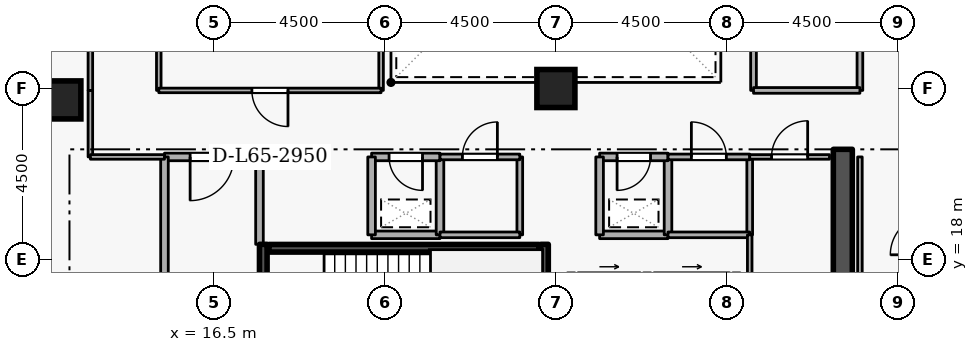
"""IFC4 building model, lengths in metres.
Left out: names, types, materials, properties, quantities, classifications, styles, units other than length and angle.
Written with IfcOpenShell. Run it as: python <this file> out.ifc"""

import sys

from ifc_helpers import new_model, si_unit, direction, frame, frame_2d, origin, origin_2d, place, context, subcontext, project, spatial, rectangle, extrude, element, fill, save


model = new_model("IFC4")
c1 = context("Model", 3, precision=1e-05, world=origin(), true_north=direction((0.0, 1.0)))
c2 = subcontext(c1, "Body", "Model", "MODEL_VIEW")
j1 = project(units=[si_unit("LENGTHUNIT", "METRE"), si_unit("PLANEANGLEUNIT", "RADIAN")], contexts=[c1])
p1 = place(None, origin())
s1 = spatial("IfcSite", under=j1, at=p1, CompositionType="ELEMENT")
p2 = place(p1, origin())
s2 = spatial("IfcBuilding", under=s1, at=p2, CompositionType="ELEMENT")
p3 = place(p2, frame((0.0, 0.0, 243.9)))
s3 = spatial("IfcBuildingStorey", under=s2, at=p3, CompositionType="ELEMENT", Elevation=243.9)
p4 = place(p3, frame((33.05, 15.1, 0.0), z_axis=(0.0, 0.0, 1.0), x_axis=(0.0, 1.0, 0.0)))
e1 = element("IfcWall", 1, at=p4, inside=s3, PredefinedType="SHEAR", context=c2, shape_type="SweptSolid", body=[
    extrude(rectangle(XDim=5.8, YDim=0.5, at=frame_2d((2.9, 0.0))), origin(), (0.0, 0.0, 1.0), 3.6),
])
for number, where, z_axis, x_axis in (
    (2, (12.5, 22.2, 0.0), (0.0, 0.0, 1.0), (1.0, 0.0, 0.0)),
    (3, (25.5, 22.5, 0.0), (0.0, 0.0, 1.0), (1.0, 0.0, 0.0)),
):
    element("IfcColumn", number, at=place(p3, frame(where, z_axis=z_axis, x_axis=x_axis)), inside=s3, PredefinedType="COLUMN", context=c2, shape_type="SweptSolid", body=[
        extrude(rectangle(XDim=1.0, YDim=1.0, at=origin_2d()), origin(), (0.0, 0.0, 1.0), 3.6),
    ])
p5 = place(p3, frame((26.08, 17.55, 0.0), z_axis=(0.0, 0.0, 1.0), x_axis=(1.0, 0.0, 0.0)))
e4 = element("IfcWall", 4, at=p5, inside=s3, PredefinedType="STANDARD", context=c2, shape_type="SweptSolid", body=[
    extrude(rectangle(XDim=1.64, YDim=0.2, at=frame_2d((0.82, 0.0))), origin(), (0.0, 0.0, 1.0), 3.34),
])
p6 = place(p5, frame((0.31, 0.0, 0.0)))
e5 = element("IfcOpeningElement", 5, at=p6, cuts=e4, PredefinedType="OPENING", context=c2, shape_type="SweptSolid", body=[
    extrude(rectangle(XDim=1.02, YDim=2.06, at=frame_2d((0.51, 1.03))), frame((0.0, 0.11, 0.0), z_axis=(0.0, -1.0, 0.0), x_axis=(1.0, 0.0, 0.0)), (0.0, 0.0, 1.0), 0.22),
])
p7 = place(p3, frame((28.08, 17.55, 0.0), z_axis=(0.0, 0.0, 1.0), x_axis=(1.0, 0.0, 0.0)))
e6 = element("IfcWall", 6, at=p7, inside=s3, PredefinedType="STANDARD", context=c2, shape_type="SweptSolid", body=[
    extrude(rectangle(XDim=1.99, YDim=0.2, at=frame_2d((0.995, 0.0))), origin(), (0.0, 0.0, 1.0), 3.34),
])
p8 = place(p7, frame((0.485, 0.0, 0.0)))
e7 = element("IfcOpeningElement", 7, at=p8, cuts=e6, PredefinedType="OPENING", context=c2, shape_type="SweptSolid", body=[
    extrude(rectangle(XDim=1.02, YDim=2.06, at=frame_2d((0.51, 1.03))), frame((0.0, 0.11, 0.0), z_axis=(0.0, -1.0, 0.0), x_axis=(1.0, 0.0, 0.0)), (0.0, 0.0, 1.0), 0.22),
])
p9 = place(p3, frame((17.8, 15.05, 0.0), z_axis=(0.0, 0.0, 1.0), x_axis=(0.0, 1.0, 0.0)))
e8 = element("IfcWall", 8, at=p9, inside=s3, PredefinedType="SHEAR", context=c2, shape_type="SweptSolid", body=[
    extrude(rectangle(XDim=3.35, YDim=0.2, at=frame_2d((1.675, 0.0))), origin(), (0.0, 0.0, 1.0), 3.6),
])
p10 = place(p9, frame((1.125, 0.0, 0.0)))
e9 = element("IfcOpeningElement", 9, at=p10, cuts=e8, PredefinedType="OPENING", context=c2, shape_type="SweptSolid", body=[
    extrude(rectangle(XDim=1.1, YDim=2.1, at=frame_2d((0.55, 1.05))), frame((0.0, 0.11, 0.0), z_axis=(0.0, -1.0, 0.0), x_axis=(1.0, 0.0, 0.0)), (0.0, 0.0, 1.0), 0.22),
])
p11 = place(p3, frame((25.2, 18.4, 0.0), z_axis=(0.0, 0.0, 1.0), x_axis=(0.0, -1.0, 0.0)))
e10 = element("IfcWall", 10, at=p11, inside=s3, PredefinedType="SHEAR", context=c2, shape_type="SweptSolid", body=[
    extrude(rectangle(XDim=3.35, YDim=0.2, at=frame_2d((1.675, 0.0))), origin(), (0.0, 0.0, 1.0), 3.6),
])
p12 = place(p3, frame((25.05, 18.297, 0.0), z_axis=(0.0, 0.0, 1.0), x_axis=(-1.0, 0.0, 0.0)))
e11 = element("IfcWall", 11, at=p12, inside=s3, PredefinedType="SHEAR", context=c2, shape_type="SweptSolid", body=[
    extrude(rectangle(XDim=7.1, YDim=0.2, at=frame_2d((3.55, 0.0))), origin(), (0.0, 0.0, 1.0), 3.6),
])
p13 = place(p3, frame((17.7, 18.4, 0.0), z_axis=(0.0, 0.0, 1.0), x_axis=(0.0, 1.0, 0.0)))
e12 = element("IfcWall", 12, at=p13, inside=s3, PredefinedType="STANDARD", context=c2, shape_type="SweptSolid", body=[
    extrude(rectangle(XDim=2.3, YDim=0.2, at=frame_2d((1.15, 0.0))), origin(), (0.0, 0.0, 1.0), 2.545),
])
p14 = place(p3, frame((17.7, 20.7, 0.0), z_axis=(0.0, 0.0, 1.0), x_axis=(-1.0, 0.0, 0.0)))
e13 = element("IfcWall", 13, at=p14, inside=s3, PredefinedType="STANDARD", context=c2, shape_type="SweptSolid", body=[
    extrude(rectangle(XDim=2.5, YDim=0.2, at=frame_2d((1.25, 0.0))), origin(), (0.0, 0.0, 1.0), 3.34),
])
p15 = place(p14, frame((0.675, 0.0, 0.0)))
e14 = element("IfcOpeningElement", 14, at=p15, cuts=e13, PredefinedType="OPENING", context=c2, shape_type="SweptSolid", body=[
    extrude(rectangle(XDim=1.15, YDim=2.1, at=frame_2d((0.575, 1.05))), frame((0.0, 0.11, 0.0), z_axis=(0.0, -1.0, 0.0), x_axis=(1.0, 0.0, 0.0)), (0.0, 0.0, 1.0), 0.22),
])
p16 = place(p3, frame((15.2, 20.7, 0.0), z_axis=(0.0, 0.0, 1.0), x_axis=(0.0, -1.0, 0.0)))
e15 = element("IfcWall", 15, at=p16, inside=s3, PredefinedType="STANDARD", context=c2, shape_type="SweptSolid", body=[
    extrude(rectangle(XDim=5.7, YDim=0.2, at=frame_2d((2.85, 0.0))), origin(), (0.0, 0.0, 1.0), 3.34),
])
p17 = place(p3, frame((26.65, 18.65, 0.0), z_axis=(0.0, 0.0, 1.0), x_axis=(1.0, 0.0, 0.0)))
e16 = element("IfcWall", 16, at=p17, inside=s3, PredefinedType="STANDARD", context=c2, shape_type="SweptSolid", body=[
    extrude(rectangle(XDim=1.8, YDim=0.2, at=frame_2d((0.9, 0.0))), origin(), (0.0, 0.0, 1.0), 3.34),
])
p18 = place(p3, frame((28.45, 18.65, 0.0), z_axis=(0.0, 0.0, 1.0), x_axis=(0.0, 1.0, 0.0)))
e17 = element("IfcWall", 17, at=p18, inside=s3, PredefinedType="STANDARD", context=c2, shape_type="SweptSolid", body=[
    extrude(rectangle(XDim=2.05, YDim=0.2, at=frame_2d((1.025, 0.0))), origin(), (0.0, 0.0, 1.0), 3.34),
])
p19 = place(p3, frame((28.45, 20.7, 0.0), z_axis=(0.0, 0.0, 1.0), x_axis=(-1.0, 0.0, 0.0)))
e18 = element("IfcWall", 18, at=p19, inside=s3, PredefinedType="STANDARD", context=c2, shape_type="SweptSolid", body=[
    extrude(rectangle(XDim=1.8, YDim=0.2, at=frame_2d((0.9, 0.0))), origin(), (0.0, 0.0, 1.0), 3.34),
])
p20 = place(p19, frame((0.46, 0.0, 0.0)))
e19 = element("IfcOpeningElement", 19, at=p20, cuts=e18, PredefinedType="OPENING", context=c2, shape_type="SweptSolid", body=[
    extrude(rectangle(XDim=0.88, YDim=2.04, at=frame_2d((0.44, 1.02))), frame((0.0, 0.11, 0.0), z_axis=(0.0, -1.0, 0.0), x_axis=(1.0, 0.0, 0.0)), (0.0, 0.0, 1.0), 0.22),
])
p21 = place(p3, frame((26.65, 20.7, 0.0), z_axis=(0.0, 0.0, 1.0), x_axis=(0.0, -1.0, 0.0)))
e20 = element("IfcWall", 20, at=p21, inside=s3, PredefinedType="STANDARD", context=c2, shape_type="SweptSolid", body=[
    extrude(rectangle(XDim=2.05, YDim=0.2, at=frame_2d((1.025, 0.0))), origin(), (0.0, 0.0, 1.0), 3.34),
])
p22 = place(p3, frame((20.65, 18.65, 0.0), z_axis=(0.0, 0.0, 1.0), x_axis=(1.0, 0.0, 0.0)))
e21 = element("IfcWall", 21, at=p22, inside=s3, PredefinedType="STANDARD", context=c2, shape_type="SweptSolid", body=[
    extrude(rectangle(XDim=1.8, YDim=0.2, at=frame_2d((0.9, 0.0))), origin(), (0.0, 0.0, 1.0), 3.34),
])
p23 = place(p3, frame((22.45, 18.65, 0.0), z_axis=(0.0, 0.0, 1.0), x_axis=(0.0, 1.0, 0.0)))
e22 = element("IfcWall", 22, at=p23, inside=s3, PredefinedType="STANDARD", context=c2, shape_type="SweptSolid", body=[
    extrude(rectangle(XDim=2.05, YDim=0.2, at=frame_2d((1.025, 0.0))), origin(), (0.0, 0.0, 1.0), 3.34),
])
p24 = place(p3, frame((22.45, 20.7, 0.0), z_axis=(0.0, 0.0, 1.0), x_axis=(-1.0, 0.0, 0.0)))
e23 = element("IfcWall", 23, at=p24, inside=s3, PredefinedType="STANDARD", context=c2, shape_type="SweptSolid", body=[
    extrude(rectangle(XDim=1.8, YDim=0.2, at=frame_2d((0.9, 0.0))), origin(), (0.0, 0.0, 1.0), 3.34),
])
p25 = place(p24, frame((0.46, 0.0, 0.0)))
e24 = element("IfcOpeningElement", 24, at=p25, cuts=e23, PredefinedType="OPENING", context=c2, shape_type="SweptSolid", body=[
    extrude(rectangle(XDim=0.88, YDim=2.04, at=frame_2d((0.44, 1.02))), frame((0.0, 0.11, 0.0), z_axis=(0.0, -1.0, 0.0), x_axis=(1.0, 0.0, 0.0)), (0.0, 0.0, 1.0), 0.22),
])
p26 = place(p3, frame((20.65, 20.7, 0.0), z_axis=(0.0, 0.0, 1.0), x_axis=(0.0, -1.0, 0.0)))
e25 = element("IfcWall", 25, at=p26, inside=s3, PredefinedType="STANDARD", context=c2, shape_type="SweptSolid", body=[
    extrude(rectangle(XDim=2.05, YDim=0.2, at=frame_2d((1.025, 0.0))), origin(), (0.0, 0.0, 1.0), 3.34),
])
p27 = place(p3, frame((24.55, 20.7, 0.0), z_axis=(0.0, 0.0, 1.0), x_axis=(0.0, -1.0, 0.0)))
e26 = element("IfcWall", 26, at=p27, inside=s3, PredefinedType="PARTITIONING", context=c2, shape_type="SweptSolid", body=[
    extrude(rectangle(XDim=2.05, YDim=0.15, at=frame_2d((1.025, 0.0))), origin(), (0.0, 0.0, 1.0), 3.34),
])
p28 = place(p3, frame((24.55, 18.65, 0.0), z_axis=(0.0, 0.0, 1.0), x_axis=(-1.0, 0.0, 0.0)))
e27 = element("IfcWall", 27, at=p28, inside=s3, PredefinedType="PARTITIONING", context=c2, shape_type="SweptSolid", body=[
    extrude(rectangle(XDim=2.1, YDim=0.15, at=frame_2d((1.05, 0.0))), origin(), (0.0, 0.0, 1.0), 3.34),
])
p29 = place(p3, frame((22.45, 20.7, 0.0), z_axis=(0.0, 0.0, 1.0), x_axis=(1.0, 0.0, 0.0)))
e28 = element("IfcWall", 28, at=p29, inside=s3, PredefinedType="PARTITIONING", context=c2, shape_type="SweptSolid", body=[
    extrude(rectangle(XDim=2.1, YDim=0.15, at=frame_2d((1.05, 0.0))), origin(), (0.0, 0.0, 1.0), 3.34),
])
p30 = place(p29, frame((0.59, 0.0, 0.0)))
e29 = element("IfcOpeningElement", 29, at=p30, cuts=e28, PredefinedType="OPENING", context=c2, shape_type="SweptSolid", body=[
    extrude(rectangle(XDim=0.92, YDim=2.08, at=frame_2d((0.46, 1.04))), frame((0.0, 0.085, 0.0), z_axis=(0.0, -1.0, 0.0), x_axis=(1.0, 0.0, 0.0)), (0.0, 0.0, 1.0), 0.17),
])
p31 = place(p3, frame((30.6, 20.7, 0.0), z_axis=(0.0, 0.0, 1.0), x_axis=(0.0, -1.0, 0.0)))
e30 = element("IfcWall", 30, at=p31, inside=s3, PredefinedType="PARTITIONING", context=c2, shape_type="SweptSolid", body=[
    extrude(rectangle(XDim=2.05, YDim=0.15, at=frame_2d((1.025, 0.0))), origin(), (0.0, 0.0, 1.0), 3.34),
])
p32 = place(p3, frame((30.6, 18.65, 0.0), z_axis=(0.0, 0.0, 1.0), x_axis=(-1.0, 0.0, 0.0)))
e31 = element("IfcWall", 31, at=p32, inside=s3, PredefinedType="PARTITIONING", context=c2, shape_type="SweptSolid", body=[
    extrude(rectangle(XDim=2.15, YDim=0.15, at=frame_2d((1.075, 0.0))), origin(), (0.0, 0.0, 1.0), 3.34),
])
p33 = place(p3, frame((28.45, 20.7, 0.0), z_axis=(0.0, 0.0, 1.0), x_axis=(1.0, 0.0, 0.0)))
e32 = element("IfcWall", 32, at=p33, inside=s3, PredefinedType="PARTITIONING", context=c2, shape_type="SweptSolid", body=[
    extrude(rectangle(XDim=2.15, YDim=0.15, at=frame_2d((1.075, 0.0))), origin(), (0.0, 0.0, 1.0), 3.34),
])
p34 = place(p33, frame((0.615, 0.0, 0.0)))
e33 = element("IfcOpeningElement", 33, at=p34, cuts=e32, PredefinedType="OPENING", context=c2, shape_type="SweptSolid", body=[
    extrude(rectangle(XDim=0.92, YDim=2.08, at=frame_2d((0.46, 1.04))), frame((0.0, 0.085, 0.0), z_axis=(0.0, -1.0, 0.0), x_axis=(1.0, 0.0, 0.0)), (0.0, 0.0, 1.0), 0.17),
])
p35 = place(p3, frame((30.6, 15.1, 0.0), z_axis=(0.0, 0.0, 1.0), x_axis=(0.0, 1.0, 0.0)))
e34 = element("IfcWall", 34, at=p35, inside=s3, PredefinedType="PARTITIONING", context=c2, shape_type="SweptSolid", body=[
    extrude(rectangle(XDim=3.55, YDim=0.12, at=frame_2d((1.775, 0.0))), origin(), (0.0, 0.0, 1.0), 3.34),
])
p36 = place(p3, frame((30.6, 20.7, 0.0), z_axis=(0.0, 0.0, 1.0), x_axis=(1.0, 0.0, 0.0)))
e35 = element("IfcWall", 35, at=p36, inside=s3, PredefinedType="PARTITIONING", context=c2, shape_type="SweptSolid", body=[
    extrude(rectangle(XDim=2.1, YDim=0.12, at=frame_2d((1.05, 0.0))), origin(), (0.0, 0.0, 1.0), 3.34),
])
p37 = place(p36, frame((0.575, 0.0, 0.0)))
e36 = element("IfcOpeningElement", 36, at=p37, cuts=e35, PredefinedType="OPENING", context=c2, shape_type="SweptSolid", body=[
    extrude(rectangle(XDim=0.95, YDim=2.1, at=frame_2d((0.475, 1.05))), frame((0.0, 0.07, 0.0), z_axis=(0.0, -1.0, 0.0), x_axis=(1.0, 0.0, 0.0)), (0.0, 0.0, 1.0), 0.14),
])
p38 = place(p3, frame((33.5, 20.7, 0.0), z_axis=(0.0, 0.0, 1.0), x_axis=(0.0, -1.0, 0.0)))
e37 = element("IfcWall", 37, at=p38, inside=s3, PredefinedType="PARTITIONING", context=c2, shape_type="SweptSolid", body=[
    extrude(rectangle(XDim=5.9, YDim=0.12, at=frame_2d((2.95, 0.0))), origin(), (0.0, 0.0, 1.0), 3.34),
])
p39 = place(p3, frame((13.25, 22.45, 0.0), z_axis=(0.0, 0.0, 1.0), x_axis=(0.0, -1.0, 0.0)))
e38 = element("IfcWall", 38, at=p39, inside=s3, PredefinedType="PARTITIONING", context=c2, shape_type="SweptSolid", body=[
    extrude(rectangle(XDim=1.75, YDim=0.12, at=frame_2d((0.875, 0.0))), origin(), (0.0, 0.0, 1.0), 3.34),
])
p40 = place(p3, frame((13.25, 20.7, 0.0), z_axis=(0.0, 0.0, 1.0), x_axis=(1.0, 0.0, 0.0)))
e39 = element("IfcWall", 39, at=p40, inside=s3, PredefinedType="PARTITIONING", context=c2, shape_type="SweptSolid", body=[
    extrude(rectangle(XDim=1.95, YDim=0.12, at=frame_2d((0.975, 0.0))), origin(), (0.0, 0.0, 1.0), 3.34),
])
p41 = place(p3, frame((13.25, 28.2, 0.0), z_axis=(0.0, 0.0, 1.0), x_axis=(0.0, -1.0, 0.0)))
e40 = element("IfcWall", 40, at=p41, inside=s3, PredefinedType="PARTITIONING", context=c2, shape_type="SweptSolid", body=[
    extrude(rectangle(XDim=5.75, YDim=0.12, at=frame_2d((2.875, 0.0))), origin(), (0.0, 0.0, 1.0), 3.34),
])
p42 = place(p41, frame((2.35, 0.0, 0.0)))
e41 = element("IfcOpeningElement", 41, at=p42, cuts=e40, PredefinedType="OPENING", context=c2, shape_type="SweptSolid", body=[
    extrude(rectangle(XDim=1.05, YDim=2.1, at=frame_2d((0.525, 1.05))), frame((0.0, 0.07, 0.0), z_axis=(0.0, -1.0, 0.0), x_axis=(1.0, 0.0, 0.0)), (0.0, 0.0, 1.0), 0.14),
])
for number, where, z_axis, x_axis in (
    (42, (15.05, 22.45, 0.0), (0.0, 0.0, 1.0), (0.0, 1.0, 0.0)),
    (43, (20.9, 28.2, 0.0), (0.0, 0.0, 1.0), (0.0, -1.0, 0.0)),
):
    element("IfcWall", number, at=place(p3, frame(where, z_axis=z_axis, x_axis=x_axis)), inside=s3, PredefinedType="PARTITIONING", context=c2, shape_type="SweptSolid", body=[
        extrude(rectangle(XDim=5.75, YDim=0.12, at=frame_2d((2.875, 0.0))), origin(), (0.0, 0.0, 1.0), 3.34),
    ])
p43 = place(p3, frame((20.9, 22.45, 0.0), z_axis=(0.0, 0.0, 1.0), x_axis=(-1.0, 0.0, 0.0)))
e44 = element("IfcWall", 44, at=p43, inside=s3, PredefinedType="PARTITIONING", context=c2, shape_type="SweptSolid", body=[
    extrude(rectangle(XDim=5.85, YDim=0.12, at=frame_2d((2.925, 0.0))), origin(), (0.0, 0.0, 1.0), 3.34),
])
p44 = place(p43, frame((2.45, 0.0, 0.0)))
e45 = element("IfcOpeningElement", 45, at=p44, cuts=e44, PredefinedType="OPENING", context=c2, shape_type="SweptSolid", body=[
    extrude(rectangle(XDim=0.95, YDim=2.1, at=frame_2d((0.475, 1.05))), frame((0.0, 0.07, 0.0), z_axis=(0.0, -1.0, 0.0), x_axis=(1.0, 0.0, 0.0)), (0.0, 0.0, 1.0), 0.14),
])
p45 = place(p3, frame((30.7, 22.45, 0.0), z_axis=(0.0, 0.0, 1.0), x_axis=(0.0, 1.0, 0.0)))
e46 = element("IfcWall", 46, at=p45, inside=s3, PredefinedType="PARTITIONING", context=c2, shape_type="SweptSolid", body=[
    extrude(rectangle(XDim=4.55, YDim=0.15, at=frame_2d((2.275, 0.0))), origin(), (0.0, 0.0, 1.0), 3.34),
])
p46 = place(p3, frame((33.5, 27.0, 0.0), z_axis=(0.0, 0.0, 1.0), x_axis=(0.0, -1.0, 0.0)))
e47 = element("IfcWall", 47, at=p46, inside=s3, PredefinedType="PARTITIONING", context=c2, shape_type="SweptSolid", body=[
    extrude(rectangle(XDim=4.55, YDim=0.15, at=frame_2d((2.275, 0.0))), origin(), (0.0, 0.0, 1.0), 3.34),
])
p47 = place(p46, frame((1.625, 0.0, 0.0)))
e48 = element("IfcOpeningElement", 48, at=p47, cuts=e47, PredefinedType="OPENING", context=c2, shape_type="SweptSolid", body=[
    extrude(rectangle(XDim=1.3, YDim=2.12, at=frame_2d((0.65, 1.06))), frame((0.0, 0.085, 0.0), z_axis=(0.0, -1.0, 0.0), x_axis=(1.0, 0.0, 0.0)), (0.0, 0.0, 1.0), 0.17),
])
p48 = place(p3, frame((33.5, 22.45, 0.0), z_axis=(0.0, 0.0, 1.0), x_axis=(-1.0, 0.0, 0.0)))
e49 = element("IfcWall", 49, at=p48, inside=s3, PredefinedType="PARTITIONING", context=c2, shape_type="SweptSolid", body=[
    extrude(rectangle(XDim=2.8, YDim=0.15, at=frame_2d((1.4, 0.0))), origin(), (0.0, 0.0, 1.0), 3.34),
])
p49 = place(p15, origin())
e50 = element("IfcDoor", 50, at=p49, inside=s3, OperationType="SINGLE_SWING_RIGHT", PredefinedType="DOOR", context=c2, shape_type="SweptSolid", body=[
    extrude(rectangle(XDim=1.15, YDim=2.1, at=frame_2d((0.575, 1.05))), frame((0.0, 0.025, 0.0), z_axis=(0.0, -1.0, 0.0), x_axis=(1.0, 0.0, 0.0)), (0.0, 0.0, 1.0), 0.05),
])
fill(e14, e50)
p50 = place(p20, origin())
e51 = element("IfcDoor", 51, at=p50, inside=s3, OperationType="SINGLE_SWING_RIGHT", PredefinedType="DOOR", context=c2, shape_type="SweptSolid", body=[
    extrude(rectangle(XDim=0.88, YDim=2.04, at=frame_2d((0.44, 1.02))), frame((0.0, 0.025, 0.0), z_axis=(0.0, -1.0, 0.0), x_axis=(1.0, 0.0, 0.0)), (0.0, 0.0, 1.0), 0.05),
])
fill(e19, e51)
p51 = place(p25, origin())
e52 = element("IfcDoor", 52, at=p51, inside=s3, OperationType="SINGLE_SWING_LEFT", PredefinedType="DOOR", context=c2, shape_type="SweptSolid", body=[
    extrude(rectangle(XDim=0.88, YDim=2.04, at=frame_2d((0.44, 1.02))), frame((0.0, 0.025, 0.0), z_axis=(0.0, -1.0, 0.0), x_axis=(1.0, 0.0, 0.0)), (0.0, 0.0, 1.0), 0.05),
])
fill(e24, e52)
p52 = place(p30, origin())
e53 = element("IfcDoor", 53, at=p52, inside=s3, OperationType="SINGLE_SWING_RIGHT", PredefinedType="DOOR", context=c2, shape_type="SweptSolid", body=[
    extrude(rectangle(XDim=0.92, YDim=2.08, at=frame_2d((0.46, 1.04))), frame((0.0, 0.025, 0.0), z_axis=(0.0, -1.0, 0.0), x_axis=(1.0, 0.0, 0.0)), (0.0, 0.0, 1.0), 0.05),
])
fill(e29, e53)
p53 = place(p34, origin())
e54 = element("IfcDoor", 54, at=p53, inside=s3, OperationType="SINGLE_SWING_LEFT", PredefinedType="DOOR", context=c2, shape_type="SweptSolid", body=[
    extrude(rectangle(XDim=0.92, YDim=2.08, at=frame_2d((0.46, 1.04))), frame((0.0, 0.025, 0.0), z_axis=(0.0, -1.0, 0.0), x_axis=(1.0, 0.0, 0.0)), (0.0, 0.0, 1.0), 0.05),
])
fill(e33, e54)
p54 = place(p37, origin())
e55 = element("IfcDoor", 55, at=p54, inside=s3, OperationType="SINGLE_SWING_RIGHT", PredefinedType="DOOR", context=c2, shape_type="SweptSolid", body=[
    extrude(rectangle(XDim=0.95, YDim=2.1, at=frame_2d((0.475, 1.05))), frame((0.0, 0.025, 0.0), z_axis=(0.0, -1.0, 0.0), x_axis=(1.0, 0.0, 0.0)), (0.0, 0.0, 1.0), 0.05),
])
fill(e36, e55)
p55 = place(p44, origin())
e56 = element("IfcDoor", 56, at=p55, inside=s3, OperationType="SINGLE_SWING_LEFT", PredefinedType="DOOR", context=c2, shape_type="SweptSolid", body=[
    extrude(rectangle(XDim=0.95, YDim=2.1, at=frame_2d((0.475, 1.05))), frame((0.0, 0.025, 0.0), z_axis=(0.0, -1.0, 0.0), x_axis=(1.0, 0.0, 0.0)), (0.0, 0.0, 1.0), 0.05),
])
fill(e45, e56)
save(model, sys.argv[1])
